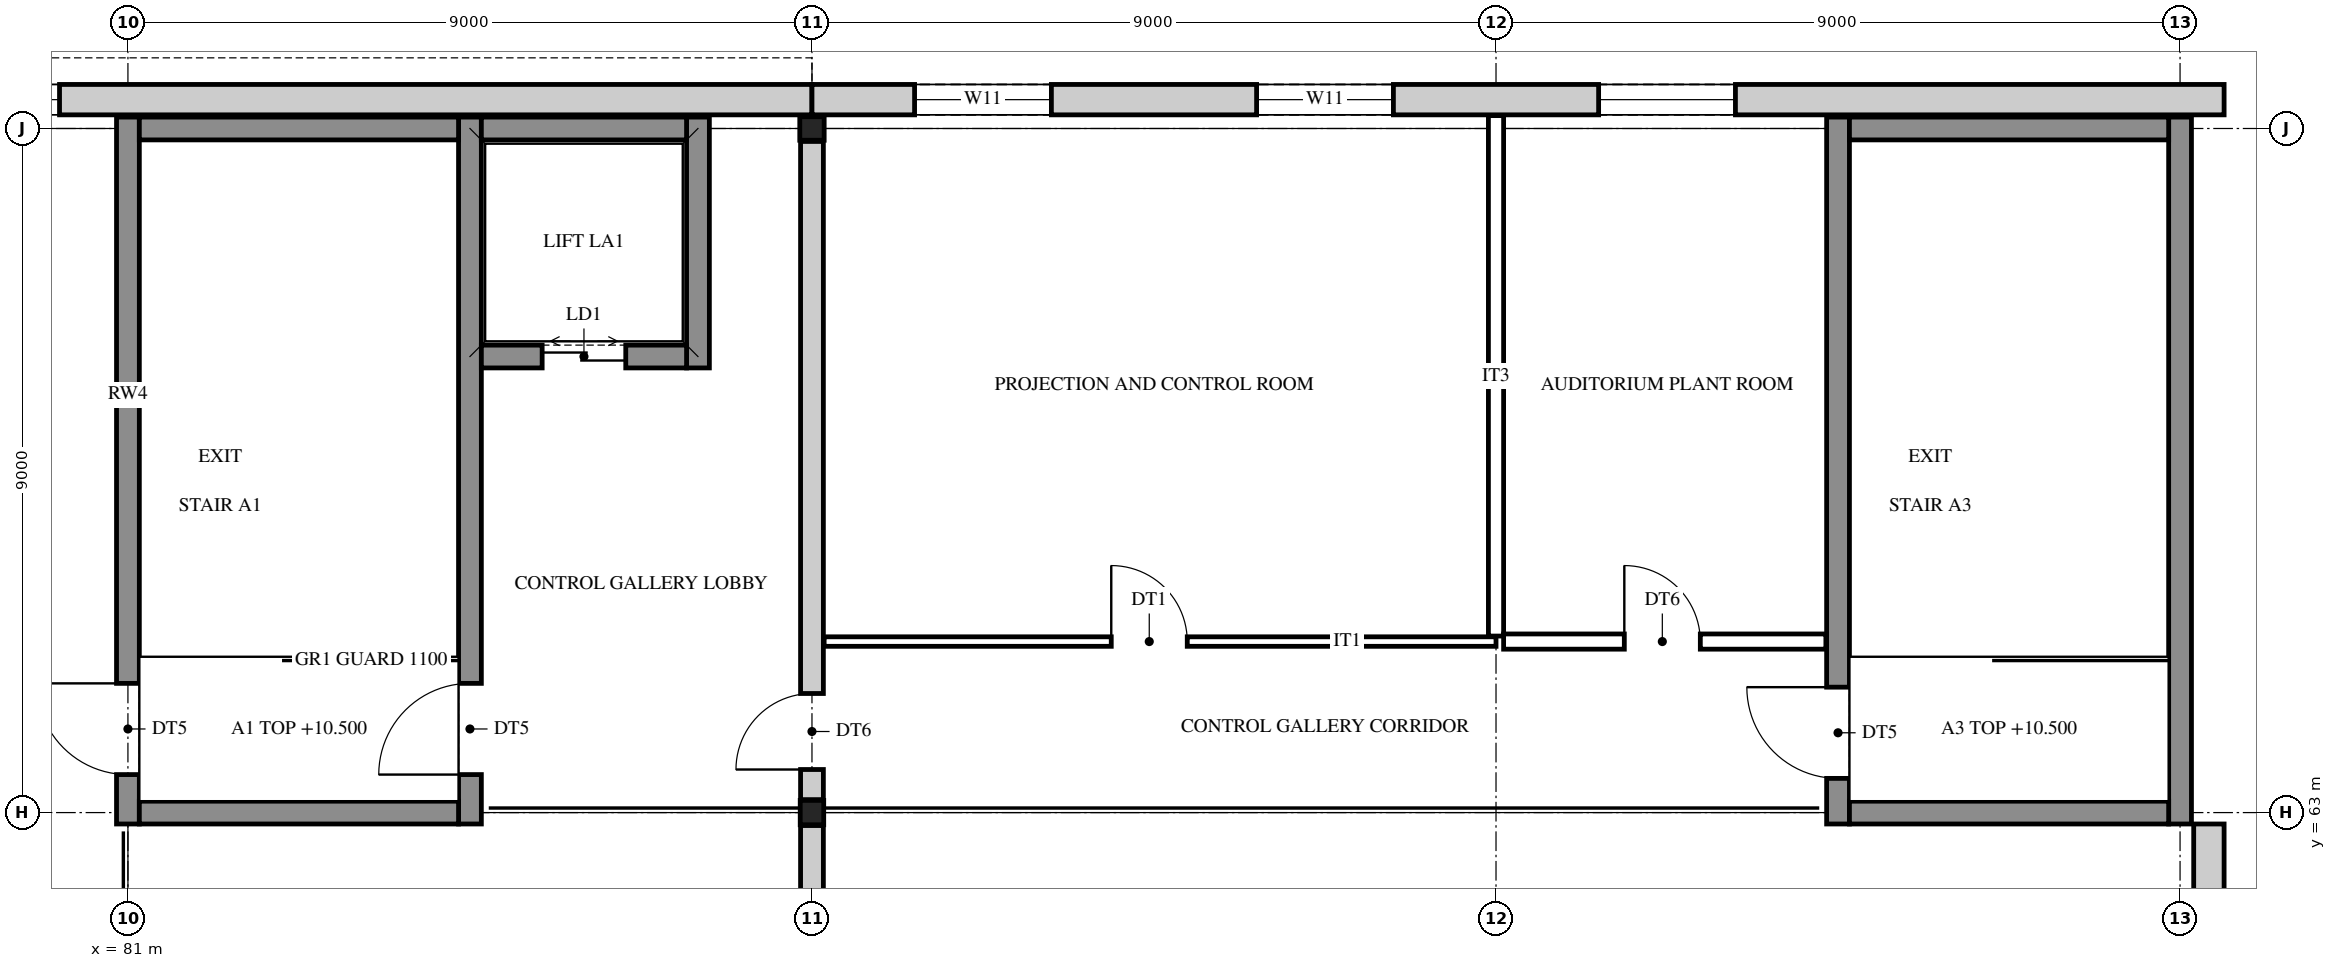
"""IFC4 building model, lengths in metres.
Left out: names, types, materials, properties, quantities, classifications, styles, units other than length and angle.
Written with IfcOpenShell. Run it as: python <this file> out.ifc"""

import sys

from ifc_helpers import new_model, si_unit, direction, frame, frame_2d, origin, origin_2d, place, context, subcontext, project, spatial, polyline, rectangle, i_section, outline, extrude, element, fill, save


model = new_model("IFC4")
c1 = context("Model", 3, precision=1e-05, world=origin(), true_north=direction((0.0, 1.0)))
c2 = subcontext(c1, "Body", "Model", "MODEL_VIEW")
j1 = project(units=[si_unit("LENGTHUNIT", "METRE"), si_unit("PLANEANGLEUNIT", "RADIAN")], contexts=[c1])
p1 = place(None, origin())
s1 = spatial("IfcSite", under=j1, at=p1, CompositionType="ELEMENT")
p2 = place(p1, origin())
s2 = spatial("IfcBuilding", under=s1, at=p2, CompositionType="ELEMENT")
p3 = place(p2, frame((0.0, 0.0, 10.5)))
s3 = spatial("IfcBuildingStorey", under=s2, at=p3, CompositionType="ELEMENT", Elevation=10.5)
for number, where, z_axis, x_axis in (
    (1, (90.0, 63.0, 0.0), (0.0, 0.0, 1.0), (1.0, 0.0, 0.0)),
    (2, (90.0, 72.0, 0.0), (0.0, 0.0, 1.0), (0.0, 1.0, 0.0)),
):
    element("IfcColumn", number, at=place(p3, frame(where, z_axis=z_axis, x_axis=x_axis)), inside=s3, PredefinedType="COLUMN", context=c2, shape_type="SweptSolid", body=[
        extrude(i_section(OverallWidth=0.309, OverallDepth=0.321, WebThickness=0.014, FlangeThickness=0.022, FilletRadius=0.017, at=origin_2d()), origin(), (0.0, 0.0, 1.0), 4.5),
    ])
p4 = place(p3, frame((81.0, 62.85, 0.0), z_axis=(0.0, 0.0, 1.0), x_axis=(0.0, 1.0, 0.0)))
e3 = element("IfcWall", 3, at=p4, inside=s3, PredefinedType="SHEAR", context=c2, shape_type="SweptSolid", body=[
    extrude(rectangle(XDim=9.3, YDim=0.3, at=frame_2d((4.65, 0.0))), origin(), (0.0, 0.0, 1.0), 4.5),
])
p5 = place(p4, frame((0.65, 0.0, 0.0)))
e4 = element("IfcOpeningElement", 4, at=p5, cuts=e3, PredefinedType="OPENING", context=c2, shape_type="SweptSolid", body=[
    extrude(rectangle(XDim=1.2, YDim=2.1, at=frame_2d((0.6, 1.05))), frame((0.0, 0.16, 0.0), z_axis=(0.0, -1.0, 0.0), x_axis=(1.0, 0.0, 0.0)), (0.0, 0.0, 1.0), 0.32),
])
p6 = place(p3, frame((85.5, 62.85, 0.0), z_axis=(0.0, 0.0, 1.0), x_axis=(0.0, 1.0, 0.0)))
e5 = element("IfcWall", 5, at=p6, inside=s3, PredefinedType="SHEAR", context=c2, shape_type="SweptSolid", body=[
    extrude(rectangle(XDim=9.3, YDim=0.3, at=frame_2d((4.65, 0.0))), origin(), (0.0, 0.0, 1.0), 4.5),
])
p7 = place(p6, frame((0.65, 0.0, 0.0)))
e6 = element("IfcOpeningElement", 6, at=p7, cuts=e5, PredefinedType="OPENING", context=c2, shape_type="SweptSolid", body=[
    extrude(rectangle(XDim=1.2, YDim=2.1, at=frame_2d((0.6, 1.05))), frame((0.0, 0.16, 0.0), z_axis=(0.0, -1.0, 0.0), x_axis=(1.0, 0.0, 0.0)), (0.0, 0.0, 1.0), 0.32),
])
p8 = place(p3, frame((88.5, 68.85, 0.0), z_axis=(0.0, 0.0, 1.0), x_axis=(0.0, 1.0, 0.0)))
e7 = element("IfcWall", 7, at=p8, inside=s3, PredefinedType="SHEAR", context=c2, shape_type="SweptSolid", body=[
    extrude(rectangle(XDim=3.3, YDim=0.3, at=frame_2d((1.65, 0.0))), origin(), (0.0, 0.0, 1.0), 4.5),
])
p9 = place(p3, frame((103.5, 62.85, 0.0), z_axis=(0.0, 0.0, 1.0), x_axis=(0.0, 1.0, 0.0)))
e8 = element("IfcWall", 8, at=p9, inside=s3, PredefinedType="SHEAR", context=c2, shape_type="SweptSolid", body=[
    extrude(rectangle(XDim=9.3, YDim=0.3, at=frame_2d((4.65, 0.0))), origin(), (0.0, 0.0, 1.0), 4.5),
])
p10 = place(p9, frame((0.6, 0.0, 0.0)))
e9 = element("IfcOpeningElement", 9, at=p10, cuts=e8, PredefinedType="OPENING", context=c2, shape_type="SweptSolid", body=[
    extrude(rectangle(XDim=1.2, YDim=2.1, at=frame_2d((0.6, 1.05))), frame((0.0, 0.16, 0.0), z_axis=(0.0, -1.0, 0.0), x_axis=(1.0, 0.0, 0.0)), (0.0, 0.0, 1.0), 0.32),
])
p11 = place(p3, frame((108.0, 62.85, 0.0), z_axis=(0.0, 0.0, 1.0), x_axis=(0.0, 1.0, 0.0)))
e10 = element("IfcWall", 10, at=p11, inside=s3, PredefinedType="SHEAR", context=c2, shape_type="SweptSolid", body=[
    extrude(rectangle(XDim=9.3, YDim=0.3, at=frame_2d((4.65, 0.0))), origin(), (0.0, 0.0, 1.0), 4.5),
])
for number, where, z_axis, x_axis in (
    (11, (81.15, 63.0, 0.0), (0.0, 0.0, 1.0), (1.0, 0.0, 0.0)),
    (12, (103.65, 63.0, 0.0), (0.0, 0.0, 1.0), (1.0, 0.0, 0.0)),
):
    element("IfcWall", number, at=place(p3, frame(where, z_axis=z_axis, x_axis=x_axis)), inside=s3, PredefinedType="SHEAR", context=c2, shape_type="SweptSolid", body=[
        extrude(rectangle(XDim=4.2, YDim=0.3, at=frame_2d((2.1, 0.0))), origin(), (0.0, 0.0, 1.0), 4.5),
    ])
p12 = place(p3, frame((85.65, 69.0, 0.0), z_axis=(0.0, 0.0, 1.0), x_axis=(1.0, 0.0, 0.0)))
e13 = element("IfcWall", 13, at=p12, inside=s3, PredefinedType="SHEAR", context=c2, shape_type="SweptSolid", body=[
    extrude(rectangle(XDim=2.7, YDim=0.3, at=frame_2d((1.35, 0.0))), origin(), (0.0, 0.0, 1.0), 4.5),
])
p13 = place(p12, frame((0.8, 0.0, 0.0)))
e14 = element("IfcOpeningElement", 14, at=p13, cuts=e13, PredefinedType="OPENING", context=c2, shape_type="SweptSolid", body=[
    extrude(rectangle(XDim=1.1, YDim=2.1, at=frame_2d((0.55, 1.05))), frame((0.0, 0.16, 0.0), z_axis=(0.0, -1.0, 0.0), x_axis=(1.0, 0.0, 0.0)), (0.0, 0.0, 1.0), 0.32),
])
p14 = place(p3, frame((81.15, 72.0, 0.0), z_axis=(0.0, 0.0, 1.0), x_axis=(1.0, 0.0, 0.0)))
e15 = element("IfcWall", 15, at=p14, inside=s3, PredefinedType="SHEAR", context=c2, shape_type="SweptSolid", body=[
    extrude(rectangle(XDim=4.2, YDim=0.3, at=frame_2d((2.1, 0.0))), origin(), (0.0, 0.0, 1.0), 4.5),
])
p15 = place(p3, frame((85.65, 72.0, 0.0), z_axis=(0.0, 0.0, 1.0), x_axis=(1.0, 0.0, 0.0)))
e16 = element("IfcWall", 16, at=p15, inside=s3, PredefinedType="SHEAR", context=c2, shape_type="SweptSolid", body=[
    extrude(rectangle(XDim=2.7, YDim=0.3, at=frame_2d((1.35, 0.0))), origin(), (0.0, 0.0, 1.0), 4.5),
])
p16 = place(p3, frame((103.65, 72.0, 0.0), z_axis=(0.0, 0.0, 1.0), x_axis=(1.0, 0.0, 0.0)))
e17 = element("IfcWall", 17, at=p16, inside=s3, PredefinedType="SHEAR", context=c2, shape_type="SweptSolid", body=[
    extrude(rectangle(XDim=4.2, YDim=0.3, at=frame_2d((2.1, 0.0))), origin(), (0.0, 0.0, 1.0), 4.5),
])
p17 = place(p3, frame((75.775, 72.379, 0.0), z_axis=(0.0, 0.0, 1.0), x_axis=(1.0, 0.0, 0.0)))
e18 = element("IfcWall", 18, at=p17, inside=s3, PredefinedType="STANDARD", context=c2, shape_type="SweptSolid", body=[
    extrude(rectangle(XDim=14.225, YDim=0.4, at=frame_2d((7.113, 0.0))), origin(), (0.0, 0.0, 1.0), 4.5),
])
p18 = place(p17, frame((1.625, 0.0, 0.9)))
e19 = element("IfcOpeningElement", 19, at=p18, cuts=e18, PredefinedType="OPENING", context=c2, shape_type="SweptSolid", body=[
    extrude(rectangle(XDim=2.7, YDim=2.8, at=frame_2d((1.35, 1.4))), frame((0.0, 0.21, 0.0), z_axis=(0.0, -1.0, 0.0), x_axis=(1.0, 0.0, 0.0)), (0.0, 0.0, 1.0), 0.42),
])
p19 = place(p3, frame((90.0, 72.379, 0.0), z_axis=(0.0, 0.0, 1.0), x_axis=(1.0, 0.0, 0.0)))
e20 = element("IfcWall", 20, at=p19, inside=s3, PredefinedType="STANDARD", context=c2, shape_type="SweptSolid", body=[
    extrude(rectangle(XDim=18.58, YDim=0.4, at=frame_2d((9.29, 0.0))), origin(), (0.0, 0.0, 1.0), 3.4),
])
p20 = place(p19, frame((1.35, 0.0, 0.5)))
e21 = element("IfcOpeningElement", 21, at=p20, cuts=e20, PredefinedType="OPENING", context=c2, shape_type="SweptSolid", body=[
    extrude(rectangle(XDim=1.8, YDim=2.2, at=frame_2d((0.9, 1.1))), frame((0.0, 0.21, 0.0), z_axis=(0.0, -1.0, 0.0), x_axis=(1.0, 0.0, 0.0)), (0.0, 0.0, 1.0), 0.42),
])
p21 = place(p19, frame((5.85, 0.0, 0.5)))
e22 = element("IfcOpeningElement", 22, at=p21, cuts=e20, PredefinedType="OPENING", context=c2, shape_type="SweptSolid", body=[
    extrude(rectangle(XDim=1.8, YDim=2.2, at=frame_2d((0.9, 1.1))), frame((0.0, 0.21, 0.0), z_axis=(0.0, -1.0, 0.0), x_axis=(1.0, 0.0, 0.0)), (0.0, 0.0, 1.0), 0.42),
])
p22 = place(p19, frame((10.35, 0.0, 0.5)))
e23 = element("IfcOpeningElement", 23, at=p22, cuts=e20, PredefinedType="OPENING", context=c2, shape_type="SweptSolid", body=[
    extrude(rectangle(XDim=1.8, YDim=2.2, at=frame_2d((0.9, 1.1))), frame((0.0, 0.21, 0.0), z_axis=(0.0, -1.0, 0.0), x_axis=(1.0, 0.0, 0.0)), (0.0, 0.0, 1.0), 0.42),
])
p23 = place(p3, frame((108.379, 62.85, 0.0), z_axis=(0.0, 0.0, 1.0), x_axis=(0.0, -1.0, 0.0)))
e24 = element("IfcWall", 24, at=p23, inside=s3, PredefinedType="STANDARD", context=c2, shape_type="SweptSolid", body=[
    extrude(rectangle(XDim=17.7, YDim=0.4, at=frame_2d((8.85, 0.0))), origin(), (0.0, 0.0, 1.0), 3.4),
])
p24 = place(p23, frame((10.2, 0.0, 0.5)))
e25 = element("IfcOpeningElement", 25, at=p24, cuts=e24, PredefinedType="OPENING", context=c2, shape_type="SweptSolid", body=[
    extrude(rectangle(XDim=1.8, YDim=2.2, at=frame_2d((0.9, 1.1))), frame((0.0, 0.21, 0.0), z_axis=(0.0, -1.0, 0.0), x_axis=(1.0, 0.0, 0.0)), (0.0, 0.0, 1.0), 0.42),
])
p25 = place(p3, frame((90.0, 72.379, 3.4), z_axis=(0.0, 0.0, 1.0), x_axis=(1.0, 0.0, 0.0)))
e26 = element("IfcWall", 26, at=p25, inside=s3, PredefinedType="STANDARD", context=c2, shape_type="SweptSolid", body=[
    extrude(outline(polyline([(0.0, 0.0), (18.0, 0.0), (18.0, 0.1), (15.75, 4.191), (13.5, 5.937), (11.25, 6.823), (9.0, 7.1), (6.75, 6.823), (4.5, 5.937), (2.25, 4.191), (0.0, 0.1), (0.0, 0.0)])), frame((0.0, 0.2, 0.0), z_axis=(0.0, -1.0, 0.0), x_axis=(1.0, 0.0, 0.0)), (0.0, 0.0, 1.0), 0.4),
])
p26 = place(p3, frame((90.0, 54.17, 0.0), z_axis=(0.0, 0.0, 1.0), x_axis=(0.0, 1.0, 0.0)))
e27 = element("IfcWall", 27, at=p26, inside=s3, PredefinedType="STANDARD", context=c2, shape_type="SweptSolid", body=[
    extrude(rectangle(XDim=8.659, YDim=0.3, at=frame_2d((4.33, 0.0))), origin(), (0.0, 0.0, 1.0), 3.346),
])
p27 = place(p3, frame((90.0, 63.17, 0.0), z_axis=(0.0, 0.0, 1.0), x_axis=(0.0, 1.0, 0.0)))
e28 = element("IfcWall", 28, at=p27, inside=s3, PredefinedType="STANDARD", context=c2, shape_type="SweptSolid", body=[
    extrude(rectangle(XDim=8.659, YDim=0.3, at=frame_2d((4.33, 0.0))), origin(), (0.0, 0.0, 1.0), 3.346),
])
p28 = place(p27, frame((0.396, 0.0, 0.0)))
e29 = element("IfcOpeningElement", 29, at=p28, cuts=e28, PredefinedType="OPENING", context=c2, shape_type="SweptSolid", body=[
    extrude(rectangle(XDim=1.0, YDim=2.1, at=frame_2d((0.5, 1.05))), frame((0.0, 0.16, 0.0), z_axis=(0.0, -1.0, 0.0), x_axis=(1.0, 0.0, 0.0)), (0.0, 0.0, 1.0), 0.32),
])
p29 = place(p3, frame((99.0, 65.323, 0.0), z_axis=(0.0, 0.0, 1.0), x_axis=(0.0, 1.0, 0.0)))
e30 = element("IfcWall", 30, at=p29, inside=s3, PredefinedType="PARTITIONING", context=c2, shape_type="SweptSolid", body=[
    extrude(rectangle(XDim=6.847, YDim=0.2, at=frame_2d((3.423, 0.0))), origin(), (0.0, 0.0, 1.0), 3.3),
])
p30 = place(p3, frame((90.16, 65.25, 0.0), z_axis=(0.0, 0.0, 1.0), x_axis=(1.0, 0.0, 0.0)))
e31 = element("IfcWall", 31, at=p30, inside=s3, PredefinedType="PARTITIONING", context=c2, shape_type="SweptSolid", body=[
    extrude(rectangle(XDim=8.84, YDim=0.125, at=frame_2d((4.42, 0.0))), origin(), (0.0, 0.0, 1.0), 3.3),
])
p31 = place(p30, frame((3.778, 0.0, 0.0)))
e32 = element("IfcOpeningElement", 32, at=p31, cuts=e31, PredefinedType="OPENING", context=c2, shape_type="SweptSolid", body=[
    extrude(rectangle(XDim=1.0, YDim=2.1, at=frame_2d((0.5, 1.05))), frame((0.0, 0.073, 0.0), z_axis=(0.0, -1.0, 0.0), x_axis=(1.0, 0.0, 0.0)), (0.0, 0.0, 1.0), 0.145),
])
p32 = place(p3, frame((99.1, 65.25, 0.0), z_axis=(0.0, 0.0, 1.0), x_axis=(1.0, 0.0, 0.0)))
e33 = element("IfcWall", 33, at=p32, inside=s3, PredefinedType="PARTITIONING", context=c2, shape_type="SweptSolid", body=[
    extrude(rectangle(XDim=4.24, YDim=0.2, at=frame_2d((2.12, 0.0))), origin(), (0.0, 0.0, 1.0), 3.3),
])
p33 = place(p32, frame((1.588, 0.0, 0.0)))
e34 = element("IfcOpeningElement", 34, at=p33, cuts=e33, PredefinedType="OPENING", context=c2, shape_type="SweptSolid", body=[
    extrude(rectangle(XDim=1.0, YDim=2.1, at=frame_2d((0.5, 1.05))), frame((0.0, 0.11, 0.0), z_axis=(0.0, -1.0, 0.0), x_axis=(1.0, 0.0, 0.0)), (0.0, 0.0, 1.0), 0.22),
])
p34 = place(p18, origin())
e35 = element("IfcWindow", 35, at=p34, inside=s3, PartitioningType="SINGLE_PANEL", PredefinedType="WINDOW", context=c2, shape_type="SweptSolid", body=[
    extrude(rectangle(XDim=2.7, YDim=2.8, at=frame_2d((1.35, 1.4))), frame((0.0, 0.03, 0.0), z_axis=(0.0, -1.0, 0.0), x_axis=(1.0, 0.0, 0.0)), (0.0, 0.0, 1.0), 0.06),
])
fill(e19, e35)
p35 = place(p20, origin())
e36 = element("IfcWindow", 36, at=p35, inside=s3, PartitioningType="SINGLE_PANEL", PredefinedType="WINDOW", context=c2, shape_type="SweptSolid", body=[
    extrude(rectangle(XDim=1.8, YDim=2.2, at=frame_2d((0.9, 1.1))), frame((0.0, 0.03, 0.0), z_axis=(0.0, -1.0, 0.0), x_axis=(1.0, 0.0, 0.0)), (0.0, 0.0, 1.0), 0.06),
])
fill(e21, e36)
p36 = place(p21, origin())
e37 = element("IfcWindow", 37, at=p36, inside=s3, PartitioningType="SINGLE_PANEL", PredefinedType="WINDOW", context=c2, shape_type="SweptSolid", body=[
    extrude(rectangle(XDim=1.8, YDim=2.2, at=frame_2d((0.9, 1.1))), frame((0.0, 0.03, 0.0), z_axis=(0.0, -1.0, 0.0), x_axis=(1.0, 0.0, 0.0)), (0.0, 0.0, 1.0), 0.06),
])
fill(e22, e37)
p37 = place(p22, origin())
e38 = element("IfcWindow", 38, at=p37, inside=s3, PartitioningType="SINGLE_PANEL", PredefinedType="WINDOW", context=c2, shape_type="SweptSolid", body=[
    extrude(rectangle(XDim=1.8, YDim=2.2, at=frame_2d((0.9, 1.1))), frame((0.0, 0.03, 0.0), z_axis=(0.0, -1.0, 0.0), x_axis=(1.0, 0.0, 0.0)), (0.0, 0.0, 1.0), 0.06),
])
fill(e23, e38)
p38 = place(p10, frame((1.2, 0.0, 0.0), z_axis=(0.0, 0.0, 1.0), x_axis=(-1.0, 0.0, 0.0)))
e39 = element("IfcDoor", 39, at=p38, inside=s3, OperationType="SINGLE_SWING_RIGHT", PredefinedType="DOOR", context=c2, shape_type="SweptSolid", body=[
    extrude(rectangle(XDim=1.2, YDim=2.1, at=frame_2d((0.6, 1.05))), frame((0.0, 0.025, 0.0), z_axis=(0.0, -1.0, 0.0), x_axis=(1.0, 0.0, 0.0)), (0.0, 0.0, 1.0), 0.05),
])
fill(e9, e39)
p39 = place(p28, origin())
e40 = element("IfcDoor", 40, at=p39, inside=s3, OperationType="SINGLE_SWING_LEFT", PredefinedType="DOOR", context=c2, shape_type="SweptSolid", body=[
    extrude(rectangle(XDim=1.0, YDim=2.1, at=frame_2d((0.5, 1.05))), frame((0.0, 0.025, 0.0), z_axis=(0.0, -1.0, 0.0), x_axis=(1.0, 0.0, 0.0)), (0.0, 0.0, 1.0), 0.05),
])
fill(e29, e40)
p40 = place(p31, origin())
e41 = element("IfcDoor", 41, at=p40, inside=s3, OperationType="SINGLE_SWING_LEFT", PredefinedType="DOOR", context=c2, shape_type="SweptSolid", body=[
    extrude(rectangle(XDim=1.0, YDim=2.1, at=frame_2d((0.5, 1.05))), frame((0.0, 0.025, 0.0), z_axis=(0.0, -1.0, 0.0), x_axis=(1.0, 0.0, 0.0)), (0.0, 0.0, 1.0), 0.05),
])
fill(e32, e41)
p41 = place(p33, origin())
e42 = element("IfcDoor", 42, at=p41, inside=s3, OperationType="SINGLE_SWING_LEFT", PredefinedType="DOOR", context=c2, shape_type="SweptSolid", body=[
    extrude(rectangle(XDim=1.0, YDim=2.1, at=frame_2d((0.5, 1.05))), frame((0.0, 0.025, 0.0), z_axis=(0.0, -1.0, 0.0), x_axis=(1.0, 0.0, 0.0)), (0.0, 0.0, 1.0), 0.05),
])
fill(e34, e42)
p42 = place(p7, origin())
e43 = element("IfcDoor", 43, at=p42, inside=s3, OperationType="SINGLE_SWING_LEFT", PredefinedType="DOOR", context=c2, shape_type="SweptSolid", body=[
    extrude(rectangle(XDim=1.2, YDim=2.1, at=frame_2d((0.6, 1.05))), frame((0.0, 0.025, 0.0), z_axis=(0.0, -1.0, 0.0), x_axis=(1.0, 0.0, 0.0)), (0.0, 0.0, 1.0), 0.05),
])
fill(e6, e43)
p43 = place(p5, frame((1.2, 0.0, 0.0), z_axis=(0.0, 0.0, 1.0), x_axis=(-1.0, 0.0, 0.0)))
e44 = element("IfcDoor", 44, at=p43, inside=s3, OperationType="SINGLE_SWING_RIGHT", PredefinedType="DOOR", context=c2, shape_type="SweptSolid", body=[
    extrude(rectangle(XDim=1.2, YDim=2.1, at=frame_2d((0.6, 1.05))), frame((0.0, 0.025, 0.0), z_axis=(0.0, -1.0, 0.0), x_axis=(1.0, 0.0, 0.0)), (0.0, 0.0, 1.0), 0.05),
])
fill(e4, e44)
p44 = place(p13, origin())
e45 = element("IfcDoor", 45, at=p44, inside=s3, OperationType="DOUBLE_DOOR_SLIDING", PredefinedType="DOOR", context=c2, shape_type="SweptSolid", body=[
    extrude(rectangle(XDim=1.1, YDim=2.1, at=frame_2d((0.55, 1.05))), frame((0.0, 0.025, 0.0), z_axis=(0.0, -1.0, 0.0), x_axis=(1.0, 0.0, 0.0)), (0.0, 0.0, 1.0), 0.05),
])
fill(e14, e45)
save(model, sys.argv[1])
